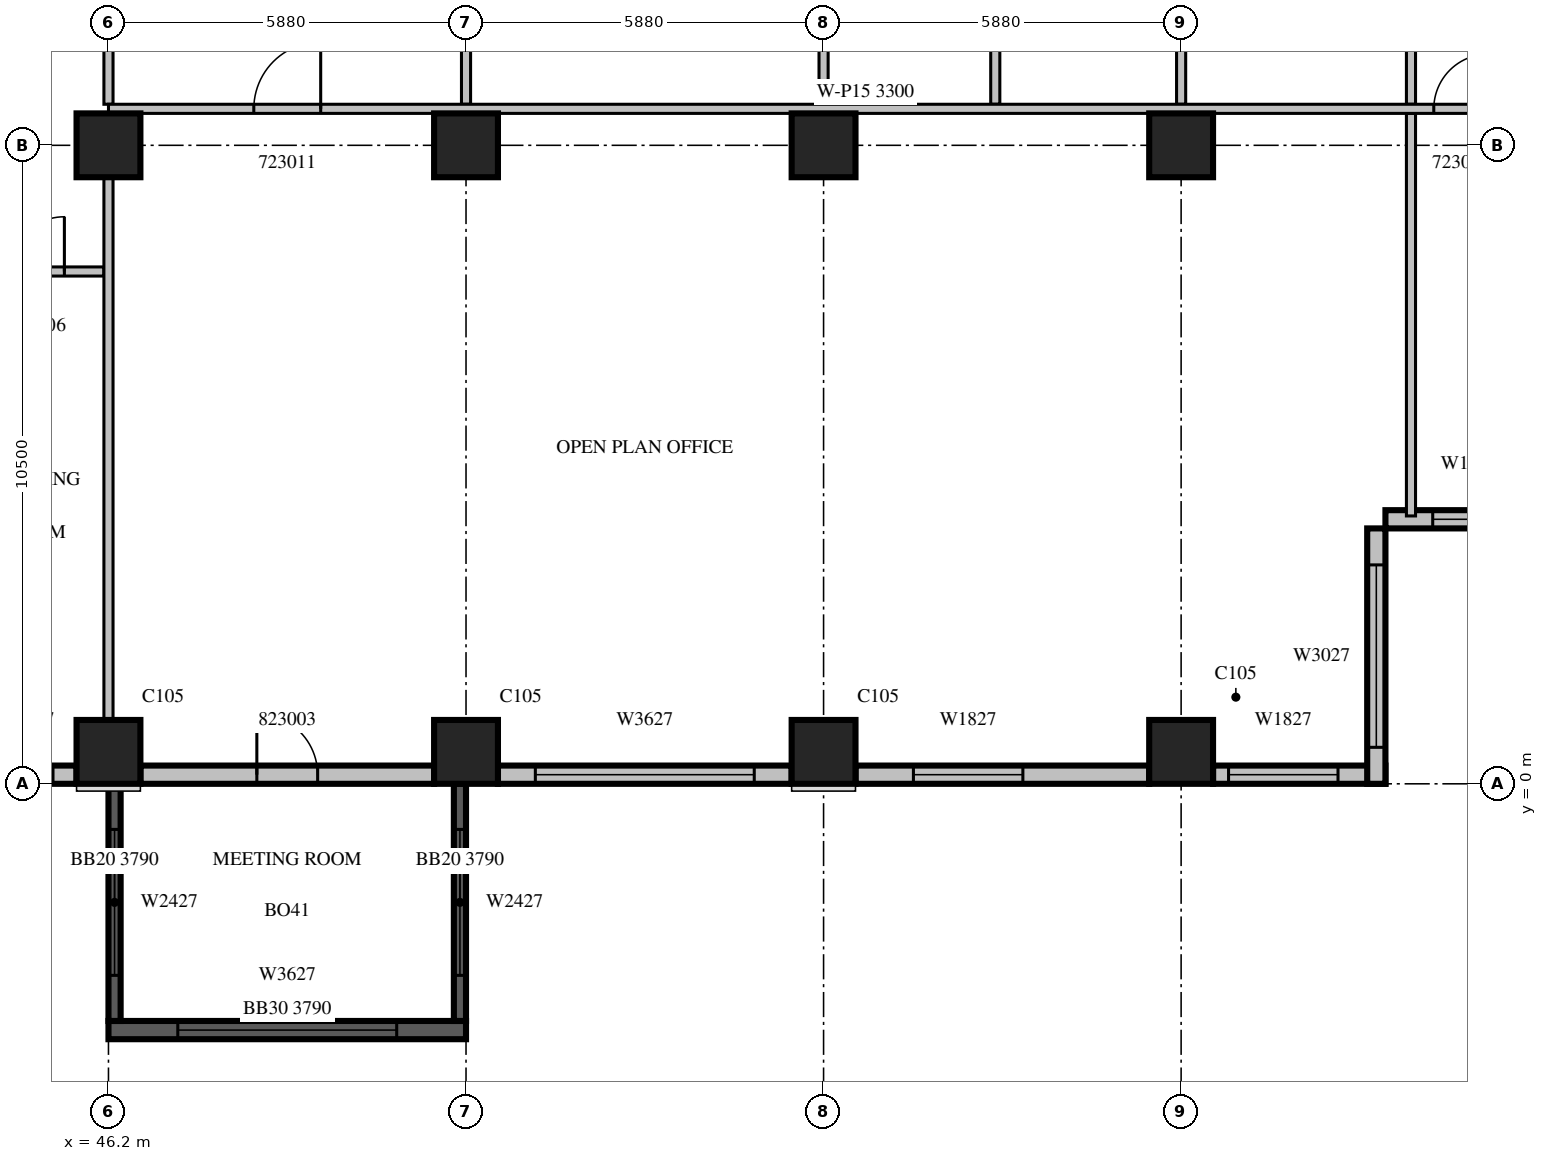
"""IFC4 building model, lengths in metres.
Left out: names, types, materials, properties, quantities, classifications, styles, units other than length and angle.
Written with IfcOpenShell. Run it as: python <this file> out.ifc"""

import sys

from ifc_helpers import new_model, si_unit, direction, frame, frame_2d, origin, origin_2d, place, context, subcontext, project, spatial, rectangle, extrude, source, transform, mapped, element, fill, save


model = new_model("IFC4")
c1 = context("Model", 3, precision=1e-05, world=origin(), true_north=direction((0.0, 1.0)))
c2 = subcontext(c1, "Body", "Model", "MODEL_VIEW")
j1 = project(units=[si_unit("LENGTHUNIT", "METRE"), si_unit("PLANEANGLEUNIT", "RADIAN")], contexts=[c1])
p1 = place(None, origin())
s1 = spatial("IfcSite", under=j1, at=p1, CompositionType="ELEMENT")
p2 = place(p1, origin())
s2 = spatial("IfcBuilding", under=s1, at=p2, CompositionType="ELEMENT")
p3 = place(p2, frame((0.0, 0.0, 107.7)))
s3 = spatial("IfcBuildingStorey", under=s2, at=p3, CompositionType="ELEMENT", Elevation=107.7)
m1 = source(origin(), c2, "Body", "SweptSolid", [
    extrude(rectangle(XDim=1.05, YDim=1.05, at=origin_2d()), origin(), (0.0, 0.0, 1.0), 4.2),
])
for number, where, z_axis, x_axis in (
    (1, (46.2, 0.525, 0.0), (0.0, 0.0, 1.0), (1.0, 0.0, 0.0)),
    (2, (52.08, 0.525, 0.0), (0.0, 0.0, 1.0), (1.0, 0.0, 0.0)),
    (3, (57.96, 0.525, 0.0), (0.0, 0.0, 1.0), (1.0, 0.0, 0.0)),
    (4, (63.84, 0.525, 0.0), (0.0, 0.0, 1.0), (1.0, 0.0, 0.0)),
    (5, (46.2, 10.5, 0.0), (0.0, 0.0, 1.0), (1.0, 0.0, 0.0)),
    (6, (52.08, 10.5, 0.0), (0.0, 0.0, 1.0), (1.0, 0.0, 0.0)),
    (7, (57.96, 10.5, 0.0), (0.0, 0.0, 1.0), (1.0, 0.0, 0.0)),
    (8, (63.84, 10.5, 0.0), (0.0, 0.0, 1.0), (1.0, 0.0, 0.0)),
):
    element("IfcColumn", number, at=place(p3, frame(where, z_axis=z_axis, x_axis=x_axis)), inside=s3, PredefinedType="COLUMN", context=c2, shape_type="MappedRepresentation", body=[
        mapped(m1, transform((0.0, 0.0, 0.0), scale=1.0)),
    ])
m2 = source(origin(), c2, "Body", "SweptSolid", [
    extrude(rectangle(XDim=1.675, YDim=0.3, at=frame_2d((0.838, 0.0))), origin(), (0.0, 0.0, 1.0), 3.8),
])
p4 = place(p3, frame((44.0, 0.15, 0.0), z_axis=(0.0, 0.0, 1.0), x_axis=(1.0, 0.0, 0.0)))
e9 = element("IfcWall", 9, at=p4, inside=s3, PredefinedType="STANDARD", context=c2, shape_type="MappedRepresentation", body=[
    mapped(m2, transform((0.0, 0.0, 0.0), scale=1.0)),
])
m3 = source(origin(), c2, "Body", "SweptSolid", [
    extrude(rectangle(XDim=0.9, YDim=2.7, at=frame_2d((0.45, 1.35))), frame((0.0, 0.16, 0.0), z_axis=(0.0, -1.0, 0.0), x_axis=(1.0, 0.0, 0.0)), (0.0, 0.0, 1.0), 0.32),
])
p5 = place(p4, frame((0.388, 0.0, 0.6)))
e10 = element("IfcOpeningElement", 10, at=p5, cuts=e9, PredefinedType="OPENING", context=c2, shape_type="MappedRepresentation", body=[
    mapped(m3, transform((0.0, 0.0, 0.0), scale=1.0)),
])
m4 = source(origin(), c2, "Body", "SweptSolid", [
    extrude(rectangle(XDim=4.83, YDim=0.3, at=frame_2d((2.415, 0.0))), origin(), (0.0, 0.0, 1.0), 3.8),
])
p6 = place(p3, frame((46.725, 0.15, 0.0), z_axis=(0.0, 0.0, 1.0), x_axis=(1.0, 0.0, 0.0)))
e11 = element("IfcWall", 11, at=p6, inside=s3, PredefinedType="STANDARD", context=c2, shape_type="MappedRepresentation", body=[
    mapped(m4, transform((0.0, 0.0, 0.0), scale=1.0)),
])
m5 = source(origin(), c2, "Body", "SweptSolid", [
    extrude(rectangle(XDim=1.0, YDim=2.1, at=frame_2d((0.5, 1.05))), frame((0.0, 0.16, 0.0), z_axis=(0.0, -1.0, 0.0), x_axis=(1.0, 0.0, 0.0)), (0.0, 0.0, 1.0), 0.32),
])
p7 = place(p6, frame((1.915, 0.0, 0.0)))
e12 = element("IfcOpeningElement", 12, at=p7, cuts=e11, PredefinedType="OPENING", context=c2, shape_type="MappedRepresentation", body=[
    mapped(m5, transform((0.0, 0.0, 0.0), scale=1.0)),
])
p8 = place(p3, frame((52.605, 0.15, 0.0), z_axis=(0.0, 0.0, 1.0), x_axis=(1.0, 0.0, 0.0)))
e13 = element("IfcWall", 13, at=p8, inside=s3, PredefinedType="STANDARD", context=c2, shape_type="MappedRepresentation", body=[
    mapped(m4, transform((0.0, 0.0, 0.0), scale=1.0)),
])
m6 = source(origin(), c2, "Body", "SweptSolid", [
    extrude(rectangle(XDim=3.6, YDim=2.7, at=frame_2d((1.8, 1.35))), frame((0.0, 0.16, 0.0), z_axis=(0.0, -1.0, 0.0), x_axis=(1.0, 0.0, 0.0)), (0.0, 0.0, 1.0), 0.32),
])
p9 = place(p8, frame((0.615, 0.0, 0.6)))
e14 = element("IfcOpeningElement", 14, at=p9, cuts=e13, PredefinedType="OPENING", context=c2, shape_type="MappedRepresentation", body=[
    mapped(m6, transform((0.0, 0.0, 0.0), scale=1.0)),
])
p10 = place(p3, frame((58.485, 0.15, 0.0), z_axis=(0.0, 0.0, 1.0), x_axis=(1.0, 0.0, 0.0)))
e15 = element("IfcWall", 15, at=p10, inside=s3, PredefinedType="STANDARD", context=c2, shape_type="MappedRepresentation", body=[
    mapped(m4, transform((0.0, 0.0, 0.0), scale=1.0)),
])
m7 = source(origin(), c2, "Body", "SweptSolid", [
    extrude(rectangle(XDim=1.8, YDim=2.7, at=frame_2d((0.9, 1.35))), frame((0.0, 0.16, 0.0), z_axis=(0.0, -1.0, 0.0), x_axis=(1.0, 0.0, 0.0)), (0.0, 0.0, 1.0), 0.32),
])
p11 = place(p10, frame((0.953, 0.0, 0.6)))
e16 = element("IfcOpeningElement", 16, at=p11, cuts=e15, PredefinedType="OPENING", context=c2, shape_type="MappedRepresentation", body=[
    mapped(m7, transform((0.0, 0.0, 0.0), scale=1.0)),
])
m8 = source(origin(), c2, "Body", "SweptSolid", [
    extrude(rectangle(XDim=2.835, YDim=0.3, at=frame_2d((1.417, 0.0))), origin(), (0.0, 0.0, 1.0), 3.8),
])
p12 = place(p3, frame((64.365, 0.15, 0.0), z_axis=(0.0, 0.0, 1.0), x_axis=(1.0, 0.0, 0.0)))
e17 = element("IfcWall", 17, at=p12, inside=s3, PredefinedType="STANDARD", context=c2, shape_type="MappedRepresentation", body=[
    mapped(m8, transform((0.0, 0.0, 0.0), scale=1.0)),
])
p13 = place(p12, frame((0.255, 0.0, 0.6)))
e18 = element("IfcOpeningElement", 18, at=p13, cuts=e17, PredefinedType="OPENING", context=c2, shape_type="MappedRepresentation", body=[
    mapped(m7, transform((0.0, 0.0, 0.0), scale=1.0)),
])
m9 = source(origin(), c2, "Body", "SweptSolid", [
    extrude(rectangle(XDim=4.2, YDim=0.3, at=frame_2d((2.1, 0.0))), origin(), (0.0, 0.0, 1.0), 3.8),
])
p14 = place(p3, frame((67.05, 0.0, 0.0), z_axis=(0.0, 0.0, 1.0), x_axis=(0.0, 1.0, 0.0)))
e19 = element("IfcWall", 19, at=p14, inside=s3, PredefinedType="STANDARD", context=c2, shape_type="MappedRepresentation", body=[
    mapped(m9, transform((0.0, 0.0, 0.0), scale=1.0)),
])
m10 = source(origin(), c2, "Body", "SweptSolid", [
    extrude(rectangle(XDim=3.0, YDim=2.7, at=frame_2d((1.5, 1.35))), frame((0.0, 0.16, 0.0), z_axis=(0.0, -1.0, 0.0), x_axis=(1.0, 0.0, 0.0)), (0.0, 0.0, 1.0), 0.32),
])
p15 = place(p14, frame((0.6, 0.0, 0.6)))
e20 = element("IfcOpeningElement", 20, at=p15, cuts=e19, PredefinedType="OPENING", context=c2, shape_type="MappedRepresentation", body=[
    mapped(m10, transform((0.0, 0.0, 0.0), scale=1.0)),
])
m11 = source(origin(), c2, "Body", "SweptSolid", [
    extrude(rectangle(XDim=2.52, YDim=0.3, at=frame_2d((1.26, 0.0))), origin(), (0.0, 0.0, 1.0), 3.8),
])
p16 = place(p3, frame((67.2, 4.35, 0.0), z_axis=(0.0, 0.0, 1.0), x_axis=(1.0, 0.0, 0.0)))
e21 = element("IfcWall", 21, at=p16, inside=s3, PredefinedType="STANDARD", context=c2, shape_type="MappedRepresentation", body=[
    mapped(m11, transform((0.0, 0.0, 0.0), scale=1.0)),
])
m12 = source(origin(), c2, "Body", "SweptSolid", [
    extrude(rectangle(XDim=1.2, YDim=2.7, at=frame_2d((0.6, 1.35))), frame((0.0, 0.16, 0.0), z_axis=(0.0, -1.0, 0.0), x_axis=(1.0, 0.0, 0.0)), (0.0, 0.0, 1.0), 0.32),
])
p17 = place(p16, frame((0.777, 0.0, 0.6)))
e22 = element("IfcOpeningElement", 22, at=p17, cuts=e21, PredefinedType="OPENING", context=c2, shape_type="MappedRepresentation", body=[
    mapped(m12, transform((0.0, 0.0, 0.0), scale=1.0)),
])
m13 = source(origin(), c2, "Body", "SweptSolid", [
    extrude(rectangle(XDim=5.88, YDim=0.3, at=frame_2d((2.94, 0.0))), origin(), (0.0, 0.0, 1.0), 3.79),
])
p18 = place(p3, frame((46.2, -4.05, 0.0), z_axis=(0.0, 0.0, 1.0), x_axis=(1.0, 0.0, 0.0)))
e23 = element("IfcWall", 23, at=p18, inside=s3, PredefinedType="SOLIDWALL", context=c2, shape_type="MappedRepresentation", body=[
    mapped(m13, transform((0.0, 0.0, 0.0), scale=1.0)),
])
p19 = place(p18, frame((1.14, 0.0, 0.6)))
e24 = element("IfcOpeningElement", 24, at=p19, cuts=e23, PredefinedType="OPENING", context=c2, shape_type="MappedRepresentation", body=[
    mapped(m6, transform((0.0, 0.0, 0.0), scale=1.0)),
])
m14 = source(origin(), c2, "Body", "SweptSolid", [
    extrude(rectangle(XDim=3.9, YDim=0.2, at=frame_2d((1.95, 0.0))), origin(), (0.0, 0.0, 1.0), 3.79),
])
p20 = place(p3, frame((46.3, 0.0, 0.0), z_axis=(0.0, 0.0, 1.0), x_axis=(0.0, -1.0, 0.0)))
e25 = element("IfcWall", 25, at=p20, inside=s3, PredefinedType="SOLIDWALL", context=c2, shape_type="MappedRepresentation", body=[
    mapped(m14, transform((0.0, 0.0, 0.0), scale=1.0)),
])
m15 = source(origin(), c2, "Body", "SweptSolid", [
    extrude(rectangle(XDim=2.4, YDim=2.7, at=frame_2d((1.2, 1.35))), frame((0.0, 0.11, 0.0), z_axis=(0.0, -1.0, 0.0), x_axis=(1.0, 0.0, 0.0)), (0.0, 0.0, 1.0), 0.22),
])
p21 = place(p20, frame((0.75, 0.0, 0.6)))
e26 = element("IfcOpeningElement", 26, at=p21, cuts=e25, PredefinedType="OPENING", context=c2, shape_type="MappedRepresentation", body=[
    mapped(m15, transform((0.0, 0.0, 0.0), scale=1.0)),
])
p22 = place(p3, frame((51.98, 0.0, 0.0), z_axis=(0.0, 0.0, 1.0), x_axis=(0.0, -1.0, 0.0)))
e27 = element("IfcWall", 27, at=p22, inside=s3, PredefinedType="SOLIDWALL", context=c2, shape_type="MappedRepresentation", body=[
    mapped(m14, transform((0.0, 0.0, 0.0), scale=1.0)),
])
p23 = place(p22, frame((0.75, 0.0, 0.6)))
e28 = element("IfcOpeningElement", 28, at=p23, cuts=e27, PredefinedType="OPENING", context=c2, shape_type="MappedRepresentation", body=[
    mapped(m15, transform((0.0, 0.0, 0.0), scale=1.0)),
])
m16 = source(origin(), c2, "Body", "SweptSolid", [
    extrude(rectangle(XDim=2.2, YDim=0.15, at=frame_2d((1.1, 0.0))), origin(), (0.0, 0.0, 1.0), 3.8),
])
p24 = place(p3, frame((46.125, 8.425, 0.0), z_axis=(0.0, 0.0, 1.0), x_axis=(-1.0, 0.0, 0.0)))
e29 = element("IfcWall", 29, at=p24, inside=s3, PredefinedType="PARTITIONING", context=c2, shape_type="MappedRepresentation", body=[
    mapped(m16, transform((0.0, 0.0, 0.0), scale=1.0)),
])
m17 = source(origin(), c2, "Body", "SweptSolid", [
    extrude(rectangle(XDim=0.9, YDim=2.1, at=frame_2d((0.45, 1.05))), frame((0.0, 0.085, 0.0), z_axis=(0.0, -1.0, 0.0), x_axis=(1.0, 0.0, 0.0)), (0.0, 0.0, 1.0), 0.17),
])
p25 = place(p24, frame((0.65, 0.0, 0.0)))
e30 = element("IfcOpeningElement", 30, at=p25, cuts=e29, PredefinedType="OPENING", context=c2, shape_type="MappedRepresentation", body=[
    mapped(m17, transform((0.0, 0.0, 0.0), scale=1.0)),
])
m18 = source(origin(), c2, "Body", "SweptSolid", [
    extrude(rectangle(XDim=3.525, YDim=0.15, at=frame_2d((1.762, 0.0))), origin(), (0.0, 0.0, 1.0), 3.8),
])
for number, where, z_axis, x_axis in (
    (31, (52.08, 11.175, 0.0), (0.0, 0.0, 1.0), (0.0, 1.0, 0.0)),
    (32, (57.96, 11.175, 0.0), (0.0, 0.0, 1.0), (0.0, 1.0, 0.0)),
    (33, (60.784, 11.175, 0.0), (0.0, 0.0, 1.0), (0.0, 1.0, 0.0)),
    (34, (63.84, 11.175, 0.0), (0.0, 0.0, 1.0), (0.0, 1.0, 0.0)),
):
    element("IfcWall", number, at=place(p3, frame(where, z_axis=z_axis, x_axis=x_axis)), inside=s3, PredefinedType="PARTITIONING", context=c2, shape_type="MappedRepresentation", body=[
        mapped(m18, transform((0.0, 0.0, 0.0), scale=1.0)),
    ])
m19 = source(origin(), c2, "Body", "SweptSolid", [
    extrude(rectangle(XDim=8.927, YDim=0.15, at=frame_2d((4.463, 0.0))), origin(), (0.0, 0.0, 1.0), 3.8),
])
p26 = place(p3, frame((46.2, 1.049, 0.0), z_axis=(0.0, 0.0, 1.0), x_axis=(0.0, 1.0, 0.0)))
e35 = element("IfcWall", 35, at=p26, inside=s3, PredefinedType="PARTITIONING", context=c2, shape_type="MappedRepresentation", body=[
    mapped(m19, transform((0.0, 0.0, 0.0), scale=1.0)),
])
p27 = place(p3, frame((46.2, 11.175, 0.0), z_axis=(0.0, 0.0, 1.0), x_axis=(0.0, 1.0, 0.0)))
e36 = element("IfcWall", 36, at=p27, inside=s3, PredefinedType="PARTITIONING", context=c2, shape_type="MappedRepresentation", body=[
    mapped(m18, transform((0.0, 0.0, 0.0), scale=1.0)),
])
p28 = place(p3, frame((67.62, 4.405, 0.0), z_axis=(0.0, 0.0, 1.0), x_axis=(0.0, 1.0, 0.0)))
e37 = element("IfcWall", 37, at=p28, inside=s3, PredefinedType="PARTITIONING", context=c2, shape_type="SweptSolid", body=[
    extrude(rectangle(XDim=6.62, YDim=0.15, at=frame_2d((3.31, 0.0))), origin(), (0.0, 0.0, 1.0), 3.8),
])
p29 = place(p3, frame((67.62, 11.175, 0.0), z_axis=(0.0, 0.0, 1.0), x_axis=(0.0, 1.0, 0.0)))
e38 = element("IfcWall", 38, at=p29, inside=s3, PredefinedType="PARTITIONING", context=c2, shape_type="MappedRepresentation", body=[
    mapped(m18, transform((0.0, 0.0, 0.0), scale=1.0)),
])
m20 = source(origin(), c2, "Body", "SweptSolid", [
    extrude(rectangle(XDim=24.9, YDim=0.15, at=frame_2d((12.45, 0.0))), origin(), (0.0, 0.0, 1.0), 3.3),
])
p30 = place(p3, frame((71.1, 11.1, 0.0), z_axis=(0.0, 0.0, 1.0), x_axis=(-1.0, 0.0, 0.0)))
e39 = element("IfcWall", 39, at=p30, inside=s3, PredefinedType="PARTITIONING", context=c2, shape_type="MappedRepresentation", body=[
    mapped(m20, transform((0.0, 0.0, 0.0), scale=1.0)),
])
m21 = source(origin(), c2, "Body", "SweptSolid", [
    extrude(rectangle(XDim=1.1, YDim=2.1, at=frame_2d((0.55, 1.05))), frame((0.0, 0.085, 0.0), z_axis=(0.0, -1.0, 0.0), x_axis=(1.0, 0.0, 0.0)), (0.0, 0.0, 1.0), 0.17),
])
p31 = place(p30, frame((21.41, 0.0, 0.0)))
e40 = element("IfcOpeningElement", 40, at=p31, cuts=e39, PredefinedType="OPENING", context=c2, shape_type="MappedRepresentation", body=[
    mapped(m21, transform((0.0, 0.0, 0.0), scale=1.0)),
])
p32 = place(p30, frame((2.205, 0.0, 0.0)))
e41 = element("IfcOpeningElement", 41, at=p32, cuts=e39, PredefinedType="OPENING", context=c2, shape_type="MappedRepresentation", body=[
    mapped(m17, transform((0.0, 0.0, 0.0), scale=1.0)),
])
m22 = source(origin(), c2, "Body", "SweptSolid", [
    extrude(rectangle(XDim=0.9, YDim=2.7, at=frame_2d((0.45, 1.35))), frame((0.0, 0.03, 0.0), z_axis=(0.0, -1.0, 0.0), x_axis=(1.0, 0.0, 0.0)), (0.0, 0.0, 1.0), 0.06),
])
p33 = place(p5, origin())
e42 = element("IfcWindow", 42, at=p33, inside=s3, PartitioningType="SINGLE_PANEL", PredefinedType="WINDOW", context=c2, shape_type="MappedRepresentation", body=[
    mapped(m22, transform((0.0, 0.0, 0.0), scale=1.0)),
])
fill(e10, e42)
m23 = source(origin(), c2, "Body", "SweptSolid", [
    extrude(rectangle(XDim=3.6, YDim=2.7, at=frame_2d((1.8, 1.35))), frame((0.0, 0.03, 0.0), z_axis=(0.0, -1.0, 0.0), x_axis=(1.0, 0.0, 0.0)), (0.0, 0.0, 1.0), 0.06),
])
p34 = place(p9, origin())
e43 = element("IfcWindow", 43, at=p34, inside=s3, PartitioningType="SINGLE_PANEL", PredefinedType="WINDOW", context=c2, shape_type="MappedRepresentation", body=[
    mapped(m23, transform((0.0, 0.0, 0.0), scale=1.0)),
])
fill(e14, e43)
m24 = source(origin(), c2, "Body", "SweptSolid", [
    extrude(rectangle(XDim=1.8, YDim=2.7, at=frame_2d((0.9, 1.35))), frame((0.0, 0.03, 0.0), z_axis=(0.0, -1.0, 0.0), x_axis=(1.0, 0.0, 0.0)), (0.0, 0.0, 1.0), 0.06),
])
p35 = place(p11, origin())
e44 = element("IfcWindow", 44, at=p35, inside=s3, PartitioningType="SINGLE_PANEL", PredefinedType="WINDOW", context=c2, shape_type="MappedRepresentation", body=[
    mapped(m24, transform((0.0, 0.0, 0.0), scale=1.0)),
])
fill(e16, e44)
p36 = place(p13, origin())
e45 = element("IfcWindow", 45, at=p36, inside=s3, PartitioningType="SINGLE_PANEL", PredefinedType="WINDOW", context=c2, shape_type="MappedRepresentation", body=[
    mapped(m24, transform((0.0, 0.0, 0.0), scale=1.0)),
])
fill(e18, e45)
m25 = source(origin(), c2, "Body", "SweptSolid", [
    extrude(rectangle(XDim=3.0, YDim=2.7, at=frame_2d((1.5, 1.35))), frame((0.0, 0.03, 0.0), z_axis=(0.0, -1.0, 0.0), x_axis=(1.0, 0.0, 0.0)), (0.0, 0.0, 1.0), 0.06),
])
p37 = place(p15, origin())
e46 = element("IfcWindow", 46, at=p37, inside=s3, PartitioningType="SINGLE_PANEL", PredefinedType="WINDOW", context=c2, shape_type="MappedRepresentation", body=[
    mapped(m25, transform((0.0, 0.0, 0.0), scale=1.0)),
])
fill(e20, e46)
m26 = source(origin(), c2, "Body", "SweptSolid", [
    extrude(rectangle(XDim=1.2, YDim=2.7, at=frame_2d((0.6, 1.35))), frame((0.0, 0.03, 0.0), z_axis=(0.0, -1.0, 0.0), x_axis=(1.0, 0.0, 0.0)), (0.0, 0.0, 1.0), 0.06),
])
p38 = place(p17, origin())
e47 = element("IfcWindow", 47, at=p38, inside=s3, PartitioningType="SINGLE_PANEL", PredefinedType="WINDOW", context=c2, shape_type="MappedRepresentation", body=[
    mapped(m26, transform((0.0, 0.0, 0.0), scale=1.0)),
])
fill(e22, e47)
p39 = place(p19, origin())
e48 = element("IfcWindow", 48, at=p39, inside=s3, PartitioningType="SINGLE_PANEL", PredefinedType="WINDOW", context=c2, shape_type="MappedRepresentation", body=[
    mapped(m23, transform((0.0, 0.0, 0.0), scale=1.0)),
])
fill(e24, e48)
m27 = source(origin(), c2, "Body", "SweptSolid", [
    extrude(rectangle(XDim=2.4, YDim=2.7, at=frame_2d((1.2, 1.35))), frame((0.0, 0.03, 0.0), z_axis=(0.0, -1.0, 0.0), x_axis=(1.0, 0.0, 0.0)), (0.0, 0.0, 1.0), 0.06),
])
p40 = place(p21, origin())
e49 = element("IfcWindow", 49, at=p40, inside=s3, PartitioningType="SINGLE_PANEL", PredefinedType="WINDOW", context=c2, shape_type="MappedRepresentation", body=[
    mapped(m27, transform((0.0, 0.0, 0.0), scale=1.0)),
])
fill(e26, e49)
p41 = place(p23, origin())
e50 = element("IfcWindow", 50, at=p41, inside=s3, PartitioningType="SINGLE_PANEL", PredefinedType="WINDOW", context=c2, shape_type="MappedRepresentation", body=[
    mapped(m27, transform((0.0, 0.0, 0.0), scale=1.0)),
])
fill(e28, e50)
m28 = source(origin(), c2, "Body", "SweptSolid", [
    extrude(rectangle(XDim=0.9, YDim=2.1, at=frame_2d((0.45, 1.05))), frame((0.0, 0.025, 0.0), z_axis=(0.0, -1.0, 0.0), x_axis=(1.0, 0.0, 0.0)), (0.0, 0.0, 1.0), 0.05),
])
p42 = place(p25, origin())
e51 = element("IfcDoor", 51, at=p42, inside=s3, OperationType="SINGLE_SWING_RIGHT", PredefinedType="DOOR", context=c2, shape_type="MappedRepresentation", body=[
    mapped(m28, transform((0.0, 0.0, 0.0), scale=1.0)),
])
fill(e30, e51)
m29 = source(origin(), c2, "Body", "SweptSolid", [
    extrude(rectangle(XDim=1.1, YDim=2.1, at=frame_2d((0.55, 1.05))), frame((0.0, 0.025, 0.0), z_axis=(0.0, -1.0, 0.0), x_axis=(1.0, 0.0, 0.0)), (0.0, 0.0, 1.0), 0.05),
])
p43 = place(p31, origin())
e52 = element("IfcDoor", 52, at=p43, inside=s3, OperationType="SINGLE_SWING_RIGHT", PredefinedType="DOOR", context=c2, shape_type="MappedRepresentation", body=[
    mapped(m29, transform((0.0, 0.0, 0.0), scale=1.0)),
])
fill(e40, e52)
p44 = place(p32, origin())
e53 = element("IfcDoor", 53, at=p44, inside=s3, OperationType="SINGLE_SWING_RIGHT", PredefinedType="DOOR", context=c2, shape_type="MappedRepresentation", body=[
    mapped(m28, transform((0.0, 0.0, 0.0), scale=1.0)),
])
fill(e41, e53)
m30 = source(origin(), c2, "Body", "SweptSolid", [
    extrude(rectangle(XDim=1.0, YDim=2.1, at=frame_2d((0.5, 1.05))), frame((0.0, 0.025, 0.0), z_axis=(0.0, -1.0, 0.0), x_axis=(1.0, 0.0, 0.0)), (0.0, 0.0, 1.0), 0.05),
])
p45 = place(p7, origin())
e54 = element("IfcDoor", 54, at=p45, inside=s3, OperationType="SINGLE_SWING_LEFT", PredefinedType="DOOR", context=c2, shape_type="MappedRepresentation", body=[
    mapped(m30, transform((0.0, 0.0, 0.0), scale=1.0)),
])
fill(e12, e54)
save(model, sys.argv[1])
